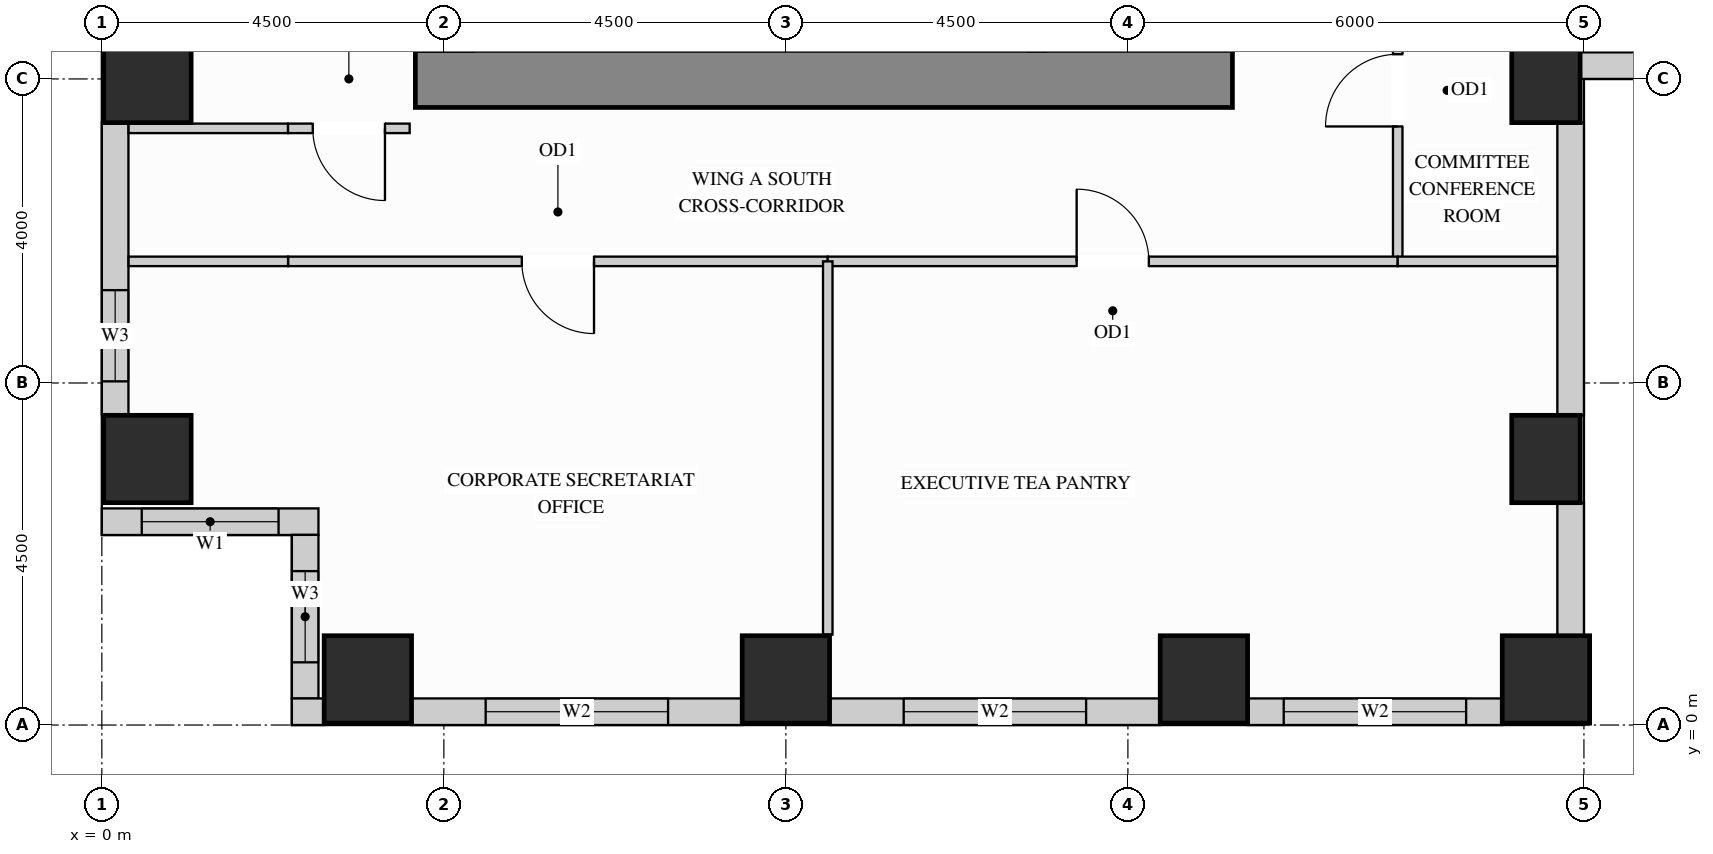
"""IFC4 building model, lengths in metres.
Left out: names, types, materials, properties, quantities, classifications, styles, units other than length and angle.
Written with IfcOpenShell. Run it as: python <this file> out.ifc"""

import sys

from ifc_helpers import new_model, si_unit, direction, frame, frame_2d, origin, origin_2d, place, context, subcontext, project, spatial, rectangle, extrude, source, transform, mapped, element, fill, save


model = new_model("IFC4")
c1 = context("Model", 3, precision=1e-05, world=origin(), true_north=direction((0.0, 1.0)))
c2 = subcontext(c1, "Body", "Model", "MODEL_VIEW")
j1 = project(units=[si_unit("LENGTHUNIT", "METRE"), si_unit("PLANEANGLEUNIT", "RADIAN")], contexts=[c1])
p1 = place(None, origin())
s1 = spatial("IfcSite", under=j1, at=p1, CompositionType="ELEMENT")
p2 = place(p1, origin())
s2 = spatial("IfcBuilding", under=s1, at=p2, CompositionType="ELEMENT")
p3 = place(p2, frame((0.0, 0.0, 88.2)))
s3 = spatial("IfcBuildingStorey", under=s2, at=p3, CompositionType="ELEMENT", Elevation=88.2)
m1 = source(origin(), c2, "Body", "SweptSolid", [
    extrude(rectangle(XDim=0.9, YDim=1.15, at=origin_2d()), origin(), (0.0, 0.0, 1.0), 3.38),
])
for number, where, z_axis, x_axis in (
    (1, (19.0, 3.5, 0.0), (0.0, 0.0, 1.0), (1.0, 0.0, 0.0)),
    (2, (19.0, 8.5, 0.0), (0.0, 0.0, 1.0), (1.0, 0.0, 0.0)),
):
    element("IfcColumn", number, at=place(p3, frame(where, z_axis=z_axis, x_axis=x_axis)), inside=s3, PredefinedType="COLUMN", context=c2, shape_type="MappedRepresentation", body=[
        mapped(m1, transform((0.0, 0.0, 0.0), x_axis=(1.0, 0.0, 0.0), y_axis=(0.0, 1.0, 0.0), z_axis=(0.0, 0.0, 1.0))),
    ])
m2 = source(origin(), c2, "Body", "SweptSolid", [
    extrude(rectangle(XDim=1.15, YDim=1.15, at=origin_2d()), origin(), (0.0, 0.0, 1.0), 3.38),
])
for number, where, z_axis, x_axis in (
    (3, (14.5, 0.6, 0.0), (0.0, 0.0, 1.0), (1.0, 0.0, 0.0)),
    (4, (19.0, 0.6, 0.0), (0.0, 0.0, 1.0), (1.0, 0.0, 0.0)),
    (5, (3.5, 0.6, 0.0), (0.0, 0.0, 1.0), (1.0, 0.0, 0.0)),
    (6, (9.0, 0.6, 0.0), (0.0, 0.0, 1.0), (1.0, 0.0, 0.0)),
    (7, (0.6, 3.5, 0.0), (0.0, 0.0, 1.0), (1.0, 0.0, 0.0)),
    (8, (0.6, 8.5, 0.0), (0.0, 0.0, 1.0), (1.0, 0.0, 0.0)),
):
    element("IfcColumn", number, at=place(p3, frame(where, z_axis=z_axis, x_axis=x_axis)), inside=s3, PredefinedType="COLUMN", context=c2, shape_type="MappedRepresentation", body=[
        mapped(m2, transform((0.0, 0.0, 0.0), x_axis=(1.0, 0.0, 0.0), y_axis=(0.0, 1.0, 0.0), z_axis=(0.0, 0.0, 1.0))),
    ])
m3 = source(origin(), c2, "Body", "SweptSolid", [
    extrude(rectangle(XDim=10.75, YDim=0.75, at=frame_2d((5.375, 0.0))), origin(), (0.0, 0.0, 1.0), 3.38),
])
p4 = place(p3, frame((4.125, 8.5, 0.0), z_axis=(0.0, 0.0, 1.0), x_axis=(1.0, 0.0, 0.0)))
e9 = element("IfcWall", 9, at=p4, inside=s3, PredefinedType="SHEAR", context=c2, shape_type="MappedRepresentation", body=[
    mapped(m3, transform((0.0, 0.0, 0.0), x_axis=(1.0, 0.0, 0.0), y_axis=(0.0, 1.0, 0.0), z_axis=(0.0, 0.0, 1.0))),
])
p5 = place(p3, frame((0.175, 7.927, 0.0), z_axis=(0.0, 0.0, 1.0), x_axis=(0.0, -1.0, 0.0)))
e10 = element("IfcWall", 10, at=p5, inside=s3, PredefinedType="SOLIDWALL", context=c2, shape_type="SweptSolid", body=[
    extrude(rectangle(XDim=3.854, YDim=0.35, at=frame_2d((1.927, 0.0))), origin(), (0.0, 0.0, 1.0), 3.365),
])
p6 = place(p5, frame((2.206, 0.0, 0.78)))
e11 = element("IfcOpeningElement", 11, at=p6, cuts=e10, PredefinedType="OPENING", context=c2, shape_type="SweptSolid", body=[
    extrude(rectangle(XDim=1.2, YDim=2.1, at=frame_2d((0.6, 1.05))), frame((0.0, 0.185, 0.0), z_axis=(0.0, -1.0, 0.0), x_axis=(1.0, 0.0, 0.0)), (0.0, 0.0, 1.0), 0.37),
])
p7 = place(p3, frame((0.0, 2.675, 0.0), z_axis=(0.0, 0.0, 1.0), x_axis=(1.0, 0.0, 0.0)))
e12 = element("IfcWall", 12, at=p7, inside=s3, PredefinedType="SOLIDWALL", context=c2, shape_type="SweptSolid", body=[
    extrude(rectangle(XDim=2.85, YDim=0.35, at=frame_2d((1.425, 0.0))), origin(), (0.0, 0.0, 1.0), 3.365),
])
p8 = place(p7, frame((0.525, 0.0, 0.78)))
e13 = element("IfcOpeningElement", 13, at=p8, cuts=e12, PredefinedType="OPENING", context=c2, shape_type="SweptSolid", body=[
    extrude(rectangle(XDim=1.8, YDim=2.1, at=frame_2d((0.9, 1.05))), frame((0.0, 0.185, 0.0), z_axis=(0.0, -1.0, 0.0), x_axis=(1.0, 0.0, 0.0)), (0.0, 0.0, 1.0), 0.37),
])
p9 = place(p3, frame((2.675, 2.502, 0.0), z_axis=(0.0, 0.0, 1.0), x_axis=(0.0, -1.0, 0.0)))
e14 = element("IfcWall", 14, at=p9, inside=s3, PredefinedType="SOLIDWALL", context=c2, shape_type="SweptSolid", body=[
    extrude(rectangle(XDim=2.154, YDim=0.35, at=frame_2d((1.077, 0.0))), origin(), (0.0, 0.0, 1.0), 3.365),
])
p10 = place(p9, frame((0.477, 0.0, 0.78)))
e15 = element("IfcOpeningElement", 15, at=p10, cuts=e14, PredefinedType="OPENING", context=c2, shape_type="SweptSolid", body=[
    extrude(rectangle(XDim=1.2, YDim=2.1, at=frame_2d((0.6, 1.05))), frame((0.0, 0.185, 0.0), z_axis=(0.0, -1.0, 0.0), x_axis=(1.0, 0.0, 0.0)), (0.0, 0.0, 1.0), 0.37),
])
m4 = source(origin(), c2, "Body", "SweptSolid", [
    extrude(rectangle(XDim=0.427, YDim=0.35, at=frame_2d((0.213, 0.0))), origin(), (0.0, 0.0, 1.0), 3.365),
])
p11 = place(p3, frame((2.5, 0.175, 0.0), z_axis=(0.0, 0.0, 1.0), x_axis=(1.0, 0.0, 0.0)))
e16 = element("IfcWall", 16, at=p11, inside=s3, PredefinedType="SOLIDWALL", context=c2, shape_type="MappedRepresentation", body=[
    mapped(m4, transform((0.0, 0.0, 0.0), x_axis=(1.0, 0.0, 0.0), y_axis=(0.0, 1.0, 0.0), z_axis=(0.0, 0.0, 1.0))),
])
p12 = place(p3, frame((4.073, 0.175, 0.0), z_axis=(0.0, 0.0, 1.0), x_axis=(1.0, 0.0, 0.0)))
e17 = element("IfcWall", 17, at=p12, inside=s3, PredefinedType="SOLIDWALL", context=c2, shape_type="SweptSolid", body=[
    extrude(rectangle(XDim=4.354, YDim=0.35, at=frame_2d((2.177, 0.0))), origin(), (0.0, 0.0, 1.0), 3.365),
])
p13 = place(p12, frame((0.977, 0.0, 0.78)))
e18 = element("IfcOpeningElement", 18, at=p13, cuts=e17, PredefinedType="OPENING", context=c2, shape_type="SweptSolid", body=[
    extrude(rectangle(XDim=2.4, YDim=2.1, at=frame_2d((1.2, 1.05))), frame((0.0, 0.185, 0.0), z_axis=(0.0, -1.0, 0.0), x_axis=(1.0, 0.0, 0.0)), (0.0, 0.0, 1.0), 0.37),
])
p14 = place(p3, frame((9.573, 0.175, 0.0), z_axis=(0.0, 0.0, 1.0), x_axis=(1.0, 0.0, 0.0)))
e19 = element("IfcWall", 19, at=p14, inside=s3, PredefinedType="SOLIDWALL", context=c2, shape_type="SweptSolid", body=[
    extrude(rectangle(XDim=4.354, YDim=0.35, at=frame_2d((2.177, 0.0))), origin(), (0.0, 0.0, 1.0), 3.365),
])
p15 = place(p14, frame((0.977, 0.0, 0.78)))
e20 = element("IfcOpeningElement", 20, at=p15, cuts=e19, PredefinedType="OPENING", context=c2, shape_type="SweptSolid", body=[
    extrude(rectangle(XDim=2.4, YDim=2.1, at=frame_2d((1.2, 1.05))), frame((0.0, 0.185, 0.0), z_axis=(0.0, -1.0, 0.0), x_axis=(1.0, 0.0, 0.0)), (0.0, 0.0, 1.0), 0.37),
])
p16 = place(p3, frame((15.073, 0.175, 0.0), z_axis=(0.0, 0.0, 1.0), x_axis=(1.0, 0.0, 0.0)))
e21 = element("IfcWall", 21, at=p16, inside=s3, PredefinedType="SOLIDWALL", context=c2, shape_type="SweptSolid", body=[
    extrude(rectangle(XDim=3.354, YDim=0.35, at=frame_2d((1.677, 0.0))), origin(), (0.0, 0.0, 1.0), 3.365),
])
p17 = place(p16, frame((0.477, 0.0, 0.78)))
e22 = element("IfcOpeningElement", 22, at=p17, cuts=e21, PredefinedType="OPENING", context=c2, shape_type="SweptSolid", body=[
    extrude(rectangle(XDim=2.4, YDim=2.1, at=frame_2d((1.2, 1.05))), frame((0.0, 0.185, 0.0), z_axis=(0.0, -1.0, 0.0), x_axis=(1.0, 0.0, 0.0)), (0.0, 0.0, 1.0), 0.37),
])
m5 = source(origin(), c2, "Body", "SweptSolid", [
    extrude(rectangle(XDim=1.754, YDim=0.35, at=frame_2d((0.877, 0.0))), origin(), (0.0, 0.0, 1.0), 2.519),
])
p18 = place(p3, frame((19.325, 1.173, 0.0), z_axis=(0.0, 0.0, 1.0), x_axis=(0.0, 1.0, 0.0)))
e23 = element("IfcWall", 23, at=p18, inside=s3, PredefinedType="SOLIDWALL", context=c2, shape_type="MappedRepresentation", body=[
    mapped(m5, transform((0.0, 0.0, 0.0), x_axis=(1.0, 0.0, 0.0), y_axis=(0.0, 1.0, 0.0), z_axis=(0.0, 0.0, 1.0))),
])
m6 = source(origin(), c2, "Body", "SweptSolid", [
    extrude(rectangle(XDim=3.854, YDim=0.35, at=frame_2d((1.927, 0.0))), origin(), (0.0, 0.0, 1.0), 2.519),
])
p19 = place(p3, frame((19.325, 4.073, 0.0), z_axis=(0.0, 0.0, 1.0), x_axis=(0.0, 1.0, 0.0)))
e24 = element("IfcWall", 24, at=p19, inside=s3, PredefinedType="SOLIDWALL", context=c2, shape_type="MappedRepresentation", body=[
    mapped(m6, transform((0.0, 0.0, 0.0), x_axis=(1.0, 0.0, 0.0), y_axis=(0.0, 1.0, 0.0), z_axis=(0.0, 0.0, 1.0))),
])
p20 = place(p3, frame((19.448, 8.675, 0.0), z_axis=(0.0, 0.0, 1.0), x_axis=(1.0, 0.0, 0.0)))
e25 = element("IfcWall", 25, at=p20, inside=s3, PredefinedType="SOLIDWALL", context=c2, shape_type="SweptSolid", body=[
    extrude(rectangle(XDim=3.504, YDim=0.35, at=frame_2d((1.752, 0.0))), origin(), (0.0, 0.0, 1.0), 3.365),
])
p21 = place(p20, frame((1.002, 0.0, 0.78)))
e26 = element("IfcOpeningElement", 26, at=p21, cuts=e25, PredefinedType="OPENING", context=c2, shape_type="SweptSolid", body=[
    extrude(rectangle(XDim=1.5, YDim=2.0, at=frame_2d((0.75, 1.0))), frame((0.0, 0.185, 0.0), z_axis=(0.0, -1.0, 0.0), x_axis=(1.0, 0.0, 0.0)), (0.0, 0.0, 1.0), 0.37),
])
p22 = place(p3, frame((17.05, 6.1, 0.0), z_axis=(0.0, 0.0, 1.0), x_axis=(0.0, 1.0, 0.0)))
e27 = element("IfcWall", 27, at=p22, inside=s3, PredefinedType="PARTITIONING", context=c2, shape_type="SweptSolid", body=[
    extrude(rectangle(XDim=4.5, YDim=0.125, at=frame_2d((2.25, 0.0))), origin(), (0.0, 0.0, 1.0), 3.365),
])
p23 = place(p22, frame((1.775, 0.0, 0.0)))
e28 = element("IfcOpeningElement", 28, at=p23, cuts=e27, PredefinedType="OPENING", context=c2, shape_type="SweptSolid", body=[
    extrude(rectangle(XDim=0.95, YDim=2.15, at=frame_2d((0.475, 1.075))), frame((0.0, 0.073, 0.0), z_axis=(0.0, -1.0, 0.0), x_axis=(1.0, 0.0, 0.0)), (0.0, 0.0, 1.0), 0.145),
])
m7 = source(origin(), c2, "Body", "SweptSolid", [
    extrude(rectangle(XDim=2.098, YDim=0.125, at=frame_2d((1.049, 0.0))), origin(), (0.0, 0.0, 1.0), 3.365),
])
p24 = place(p3, frame((0.352, 7.85, 0.0), z_axis=(0.0, 0.0, 1.0), x_axis=(1.0, 0.0, 0.0)))
e29 = element("IfcWall", 29, at=p24, inside=s3, PredefinedType="PARTITIONING", context=c2, shape_type="MappedRepresentation", body=[
    mapped(m7, transform((0.0, 0.0, 0.0), x_axis=(1.0, 0.0, 0.0), y_axis=(0.0, 1.0, 0.0), z_axis=(0.0, 0.0, 1.0))),
])
p25 = place(p3, frame((2.45, 7.85, 0.0), z_axis=(0.0, 0.0, 1.0), x_axis=(1.0, 0.0, 0.0)))
e30 = element("IfcWall", 30, at=p25, inside=s3, PredefinedType="PARTITIONING", context=c2, shape_type="SweptSolid", body=[
    extrude(rectangle(XDim=1.6, YDim=0.125, at=frame_2d((0.8, 0.0))), origin(), (0.0, 0.0, 1.0), 3.365),
])
p26 = place(p25, frame((0.325, 0.0, 0.0)))
e31 = element("IfcOpeningElement", 31, at=p26, cuts=e30, PredefinedType="OPENING", context=c2, shape_type="SweptSolid", body=[
    extrude(rectangle(XDim=0.95, YDim=2.15, at=frame_2d((0.475, 1.075))), frame((0.0, 0.073, 0.0), z_axis=(0.0, -1.0, 0.0), x_axis=(1.0, 0.0, 0.0)), (0.0, 0.0, 1.0), 0.145),
])
p27 = place(p3, frame((2.45, 6.1, 0.0), z_axis=(0.0, 0.0, 1.0), x_axis=(1.0, 0.0, 0.0)))
e32 = element("IfcWall", 32, at=p27, inside=s3, PredefinedType="PARTITIONING", context=c2, shape_type="SweptSolid", body=[
    extrude(rectangle(XDim=7.101, YDim=0.125, at=frame_2d((3.551, 0.0))), origin(), (0.0, 0.0, 1.0), 3.365),
])
p28 = place(p27, frame((3.075, 0.0, 0.0)))
e33 = element("IfcOpeningElement", 33, at=p28, cuts=e32, PredefinedType="OPENING", context=c2, shape_type="SweptSolid", body=[
    extrude(rectangle(XDim=0.95, YDim=2.15, at=frame_2d((0.475, 1.075))), frame((0.0, 0.073, 0.0), z_axis=(0.0, -1.0, 0.0), x_axis=(1.0, 0.0, 0.0)), (0.0, 0.0, 1.0), 0.145),
])
p29 = place(p3, frame((9.551, 6.1, 0.0), z_axis=(0.0, 0.0, 1.0), x_axis=(1.0, 0.0, 0.0)))
e34 = element("IfcWall", 34, at=p29, inside=s3, PredefinedType="PARTITIONING", context=c2, shape_type="SweptSolid", body=[
    extrude(rectangle(XDim=7.499, YDim=0.125, at=frame_2d((3.75, 0.0))), origin(), (0.0, 0.0, 1.0), 3.365),
])
p30 = place(p29, frame((3.274, 0.0, 0.0)))
e35 = element("IfcOpeningElement", 35, at=p30, cuts=e34, PredefinedType="OPENING", context=c2, shape_type="SweptSolid", body=[
    extrude(rectangle(XDim=0.95, YDim=2.15, at=frame_2d((0.475, 1.075))), frame((0.0, 0.073, 0.0), z_axis=(0.0, -1.0, 0.0), x_axis=(1.0, 0.0, 0.0)), (0.0, 0.0, 1.0), 0.145),
])
for number, where, z_axis, x_axis in (
    (36, (0.352, 6.1, 0.0), (0.0, 0.0, 1.0), (1.0, 0.0, 0.0)),
    (37, (17.05, 6.1, 0.0), (0.0, 0.0, 1.0), (1.0, 0.0, 0.0)),
):
    element("IfcWall", number, at=place(p3, frame(where, z_axis=z_axis, x_axis=x_axis)), inside=s3, PredefinedType="PARTITIONING", context=c2, shape_type="MappedRepresentation", body=[
        mapped(m7, transform((0.0, 0.0, 0.0), x_axis=(1.0, 0.0, 0.0), y_axis=(0.0, 1.0, 0.0), z_axis=(0.0, 0.0, 1.0))),
    ])
m8 = source(origin(), c2, "Body", "SweptSolid", [
    extrude(rectangle(XDim=4.91, YDim=0.125, at=frame_2d((2.455, 0.0))), origin(), (0.0, 0.0, 1.0), 3.365),
])
p31 = place(p3, frame((9.551, 1.19, 0.0), z_axis=(0.0, 0.0, 1.0), x_axis=(0.0, 1.0, 0.0)))
e38 = element("IfcWall", 38, at=p31, inside=s3, PredefinedType="PARTITIONING", context=c2, shape_type="MappedRepresentation", body=[
    mapped(m8, transform((0.0, 0.0, 0.0), x_axis=(1.0, 0.0, 0.0), y_axis=(0.0, 1.0, 0.0), z_axis=(0.0, 0.0, 1.0))),
])
m9 = source(origin(), c2, "Body", "SweptSolid", [
    extrude(rectangle(XDim=0.95, YDim=2.15, at=frame_2d((0.475, 1.075))), frame((0.0, 0.025, 0.0), z_axis=(0.0, -1.0, 0.0), x_axis=(1.0, 0.0, 0.0)), (0.0, 0.0, 1.0), 0.05),
])
p32 = place(p23, origin())
e39 = element("IfcDoor", 39, at=p32, inside=s3, OperationType="SINGLE_SWING_LEFT", PredefinedType="DOOR", context=c2, shape_type="MappedRepresentation", body=[
    mapped(m9, transform((0.0, 0.0, 0.0), x_axis=(1.0, 0.0, 0.0), y_axis=(0.0, 1.0, 0.0), z_axis=(0.0, 0.0, 1.0))),
])
fill(e28, e39)
p33 = place(p28, origin())
e40 = element("IfcDoor", 40, at=p33, inside=s3, OperationType="SINGLE_SWING_RIGHT", PredefinedType="DOOR", context=c2, shape_type="MappedRepresentation", body=[
    mapped(m9, transform((0.0, 0.0, 0.0), x_axis=(1.0, 0.0, 0.0), y_axis=(0.0, 1.0, 0.0), z_axis=(0.0, 0.0, 1.0))),
])
fill(e33, e40)
p34 = place(p30, origin())
e41 = element("IfcDoor", 41, at=p34, inside=s3, OperationType="SINGLE_SWING_LEFT", PredefinedType="DOOR", context=c2, shape_type="MappedRepresentation", body=[
    mapped(m9, transform((0.0, 0.0, 0.0), x_axis=(1.0, 0.0, 0.0), y_axis=(0.0, 1.0, 0.0), z_axis=(0.0, 0.0, 1.0))),
])
fill(e35, e41)
p35 = place(p26, origin())
e42 = element("IfcDoor", 42, at=p35, inside=s3, OperationType="SINGLE_SWING_RIGHT", PredefinedType="DOOR", context=c2, shape_type="MappedRepresentation", body=[
    mapped(m9, transform((0.0, 0.0, 0.0), x_axis=(1.0, 0.0, 0.0), y_axis=(0.0, 1.0, 0.0), z_axis=(0.0, 0.0, 1.0))),
])
fill(e31, e42)
m10 = source(origin(), c2, "Body", "SweptSolid", [
    extrude(rectangle(XDim=1.8, YDim=2.1, at=frame_2d((0.9, 1.05))), frame((0.0, 0.03, 0.0), z_axis=(0.0, -1.0, 0.0), x_axis=(1.0, 0.0, 0.0)), (0.0, 0.0, 1.0), 0.06),
])
p36 = place(p8, origin())
e43 = element("IfcWindow", 43, at=p36, inside=s3, PartitioningType="SINGLE_PANEL", PredefinedType="WINDOW", context=c2, shape_type="MappedRepresentation", body=[
    mapped(m10, transform((0.0, 0.0, 0.0), x_axis=(1.0, 0.0, 0.0), y_axis=(0.0, 1.0, 0.0), z_axis=(0.0, 0.0, 1.0))),
])
fill(e13, e43)
m11 = source(origin(), c2, "Body", "SweptSolid", [
    extrude(rectangle(XDim=2.4, YDim=2.1, at=frame_2d((1.2, 1.05))), frame((0.0, 0.03, 0.0), z_axis=(0.0, -1.0, 0.0), x_axis=(1.0, 0.0, 0.0)), (0.0, 0.0, 1.0), 0.06),
])
p37 = place(p13, origin())
e44 = element("IfcWindow", 44, at=p37, inside=s3, PartitioningType="SINGLE_PANEL", PredefinedType="WINDOW", context=c2, shape_type="MappedRepresentation", body=[
    mapped(m11, transform((0.0, 0.0, 0.0), x_axis=(1.0, 0.0, 0.0), y_axis=(0.0, 1.0, 0.0), z_axis=(0.0, 0.0, 1.0))),
])
fill(e18, e44)
p38 = place(p15, origin())
e45 = element("IfcWindow", 45, at=p38, inside=s3, PartitioningType="SINGLE_PANEL", PredefinedType="WINDOW", context=c2, shape_type="MappedRepresentation", body=[
    mapped(m11, transform((0.0, 0.0, 0.0), x_axis=(1.0, 0.0, 0.0), y_axis=(0.0, 1.0, 0.0), z_axis=(0.0, 0.0, 1.0))),
])
fill(e20, e45)
p39 = place(p17, origin())
e46 = element("IfcWindow", 46, at=p39, inside=s3, PartitioningType="SINGLE_PANEL", PredefinedType="WINDOW", context=c2, shape_type="MappedRepresentation", body=[
    mapped(m11, transform((0.0, 0.0, 0.0), x_axis=(1.0, 0.0, 0.0), y_axis=(0.0, 1.0, 0.0), z_axis=(0.0, 0.0, 1.0))),
])
fill(e22, e46)
m12 = source(origin(), c2, "Body", "SweptSolid", [
    extrude(rectangle(XDim=1.2, YDim=2.1, at=frame_2d((0.6, 1.05))), frame((0.0, 0.03, 0.0), z_axis=(0.0, -1.0, 0.0), x_axis=(1.0, 0.0, 0.0)), (0.0, 0.0, 1.0), 0.06),
])
p40 = place(p6, origin())
e47 = element("IfcWindow", 47, at=p40, inside=s3, PartitioningType="SINGLE_PANEL", PredefinedType="WINDOW", context=c2, shape_type="MappedRepresentation", body=[
    mapped(m12, transform((0.0, 0.0, 0.0), x_axis=(1.0, 0.0, 0.0), y_axis=(0.0, 1.0, 0.0), z_axis=(0.0, 0.0, 1.0))),
])
fill(e11, e47)
p41 = place(p10, origin())
e48 = element("IfcWindow", 48, at=p41, inside=s3, PartitioningType="SINGLE_PANEL", PredefinedType="WINDOW", context=c2, shape_type="MappedRepresentation", body=[
    mapped(m12, transform((0.0, 0.0, 0.0), x_axis=(1.0, 0.0, 0.0), y_axis=(0.0, 1.0, 0.0), z_axis=(0.0, 0.0, 1.0))),
])
fill(e15, e48)
save(model, sys.argv[1])
